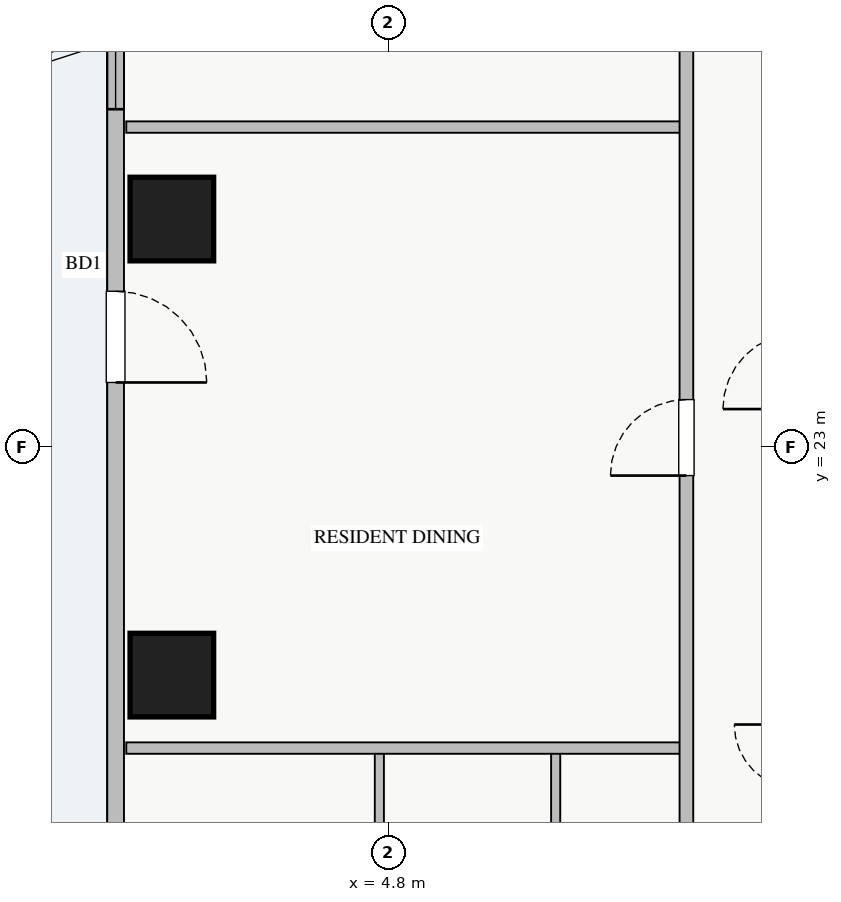
"""IFC4 building model, lengths in metres.
Left out: names, types, materials, properties, quantities, classifications, styles, units other than length and angle.
Written with IfcOpenShell. Run it as: python <this file> out.ifc"""

import sys

from ifc_helpers import new_model, si_unit, direction, frame, frame_2d, origin, origin_2d, place, context, subcontext, project, spatial, rectangle, extrude, source, transform, mapped, element, fill, save


model = new_model("IFC4")
c1 = context("Model", 3, precision=1e-05, world=origin(), true_north=direction((0.0, 1.0)))
c2 = subcontext(c1, "Body", "Model", "MODEL_VIEW")
j1 = project(units=[si_unit("LENGTHUNIT", "METRE"), si_unit("PLANEANGLEUNIT", "RADIAN")], contexts=[c1])
p1 = place(None, origin())
s1 = spatial("IfcSite", under=j1, at=p1, CompositionType="ELEMENT")
p2 = place(p1, origin())
s2 = spatial("IfcBuilding", under=s1, at=p2, CompositionType="ELEMENT")
p3 = place(p2, frame((0.0, 0.0, 129.5)))
s3 = spatial("IfcBuildingStorey", under=s2, at=p3, CompositionType="ELEMENT", Elevation=129.5)
m1 = source(origin(), c2, "Body", "SweptSolid", [
    extrude(rectangle(XDim=1.1, YDim=1.1, at=origin_2d()), origin(), (0.0, 0.0, 1.0), 3.25),
])
for number, where, z_axis, x_axis in (
    (1, (1.95, 26.0, 0.0), (0.0, 0.0, 1.0), (1.0, 0.0, 0.0)),
    (2, (1.95, 20.0, 0.0), (0.0, 0.0, 1.0), (1.0, 0.0, 0.0)),
):
    element("IfcColumn", number, at=place(p3, frame(where, z_axis=z_axis, x_axis=x_axis)), inside=s3, PredefinedType="COLUMN", context=c2, shape_type="MappedRepresentation", body=[
        mapped(m1, transform((0.0, 0.0, 0.0), x_axis=(1.0, 0.0, 0.0), y_axis=(0.0, 1.0, 0.0), z_axis=(0.0, 0.0, 1.0), scale=1.0)),
    ])
p4 = place(p3, frame((1.21, 10.55, 0.0), z_axis=(0.0, 0.0, 1.0), x_axis=(0.0, 1.0, 0.0)))
e3 = element("IfcWall", 3, at=p4, inside=s3, PredefinedType="STANDARD", context=c2, shape_type="SweptSolid", body=[
    extrude(rectangle(XDim=24.9, YDim=0.22, at=frame_2d((12.45, 0.0))), origin(), (0.0, 0.0, 1.0), 2.61),
])
p5 = place(p4, frame((13.3, 0.0, 0.0)))
e4 = element("IfcOpeningElement", 4, at=p5, cuts=e3, PredefinedType="OPENING", context=c2, shape_type="SweptSolid", body=[
    extrude(rectangle(XDim=1.2, YDim=2.1, at=frame_2d((0.6, 1.05))), frame((0.0, 0.12, 0.0), z_axis=(0.0, -1.0, 0.0), x_axis=(1.0, 0.0, 0.0)), (0.0, 0.0, 1.0), 0.24),
])
p6 = place(p4, frame((0.625, 0.0, 0.9)))
e5 = element("IfcOpeningElement", 5, at=p6, cuts=e3, PredefinedType="OPENING", context=c2, shape_type="SweptSolid", body=[
    extrude(rectangle(XDim=2.4, YDim=1.5, at=frame_2d((1.2, 0.75))), frame((0.0, 0.12, 0.0), z_axis=(0.0, -1.0, 0.0), x_axis=(1.0, 0.0, 0.0)), (0.0, 0.0, 1.0), 0.24),
])
p7 = place(p4, frame((21.82, 0.0, 0.9)))
e6 = element("IfcOpeningElement", 6, at=p7, cuts=e3, PredefinedType="OPENING", context=c2, shape_type="SweptSolid", body=[
    extrude(rectangle(XDim=2.1, YDim=1.5, at=frame_2d((1.05, 0.75))), frame((0.0, 0.12, 0.0), z_axis=(0.0, -1.0, 0.0), x_axis=(1.0, 0.0, 0.0)), (0.0, 0.0, 1.0), 0.24),
])
p8 = place(p4, frame((4.847, 0.0, 0.9)))
e7 = element("IfcOpeningElement", 7, at=p8, cuts=e3, PredefinedType="OPENING", context=c2, shape_type="SweptSolid", body=[
    extrude(rectangle(XDim=2.4, YDim=1.5, at=frame_2d((1.2, 0.75))), frame((0.0, 0.12, 0.0), z_axis=(0.0, -1.0, 0.0), x_axis=(1.0, 0.0, 0.0)), (0.0, 0.0, 1.0), 0.24),
])
p9 = place(p4, frame((16.895, 0.0, 0.9)))
e8 = element("IfcOpeningElement", 8, at=p9, cuts=e3, PredefinedType="OPENING", context=c2, shape_type="SweptSolid", body=[
    extrude(rectangle(XDim=0.9, YDim=1.2, at=frame_2d((0.45, 0.6))), frame((0.0, 0.12, 0.0), z_axis=(0.0, -1.0, 0.0), x_axis=(1.0, 0.0, 0.0)), (0.0, 0.0, 1.0), 0.24),
])
for number, where, z_axis, x_axis in (
    (9, (4.68, 14.17, 0.0), (0.0, 0.0, 1.0), (0.0, 1.0, 0.0)),
    (10, (7.0, 14.17, 0.0), (0.0, 0.0, 1.0), (0.0, 1.0, 0.0)),
):
    element("IfcWall", number, at=place(p3, frame(where, z_axis=z_axis, x_axis=x_axis)), inside=s3, PredefinedType="PLUMBINGWALL", context=c2, shape_type="SweptSolid", body=[
        extrude(rectangle(XDim=4.87, YDim=0.12, at=frame_2d((2.435, 0.0))), origin(), (0.0, 0.0, 1.0), 3.07),
    ])
for number, where, z_axis, x_axis in (
    (11, (1.35, 19.04, 0.0), (0.0, 0.0, 1.0), (1.0, 0.0, 0.0)),
    (12, (1.35, 27.21, 0.0), (0.0, 0.0, 1.0), (1.0, 0.0, 0.0)),
):
    element("IfcWall", number, at=place(p3, frame(where, z_axis=z_axis, x_axis=x_axis)), inside=s3, PredefinedType="PARTITIONING", context=c2, shape_type="SweptSolid", body=[
        extrude(rectangle(XDim=7.37, YDim=0.15, at=frame_2d((3.685, 0.0))), origin(), (0.0, 0.0, 1.0), 3.07),
    ])
p10 = place(p3, frame((8.72, 8.31, 0.0), z_axis=(0.0, 0.0, 1.0), x_axis=(0.0, 1.0, 0.0)))
e13 = element("IfcWall", 13, at=p10, inside=s3, PredefinedType="PARTITIONING", context=c2, shape_type="SweptSolid", body=[
    extrude(rectangle(XDim=29.37, YDim=0.18, at=frame_2d((14.685, 0.0))), origin(), (0.0, 0.0, 1.0), 3.07),
])
p11 = place(p10, frame((28.06, 0.0, 0.0)))
e14 = element("IfcOpeningElement", 14, at=p11, cuts=e13, PredefinedType="OPENING", context=c2, shape_type="SweptSolid", body=[
    extrude(rectangle(XDim=0.9, YDim=2.05, at=frame_2d((0.45, 1.025))), frame((0.0, 0.1, 0.0), z_axis=(0.0, -1.0, 0.0), x_axis=(1.0, 0.0, 0.0)), (0.0, 0.0, 1.0), 0.2),
])
p12 = place(p10, frame((0.24, 0.0, 0.0)))
e15 = element("IfcOpeningElement", 15, at=p12, cuts=e13, PredefinedType="OPENING", context=c2, shape_type="SweptSolid", body=[
    extrude(rectangle(XDim=0.9, YDim=2.05, at=frame_2d((0.45, 1.025))), frame((0.0, 0.1, 0.0), z_axis=(0.0, -1.0, 0.0), x_axis=(1.0, 0.0, 0.0)), (0.0, 0.0, 1.0), 0.2),
])
p13 = place(p10, frame((2.92, 0.0, 0.0)))
e16 = element("IfcOpeningElement", 16, at=p13, cuts=e13, PredefinedType="OPENING", context=c2, shape_type="SweptSolid", body=[
    extrude(rectangle(XDim=1.0, YDim=2.05, at=frame_2d((0.5, 1.025))), frame((0.0, 0.1, 0.0), z_axis=(0.0, -1.0, 0.0), x_axis=(1.0, 0.0, 0.0)), (0.0, 0.0, 1.0), 0.2),
])
p14 = place(p10, frame((14.315, 0.0, 0.0)))
e17 = element("IfcOpeningElement", 17, at=p14, cuts=e13, PredefinedType="OPENING", context=c2, shape_type="SweptSolid", body=[
    extrude(rectangle(XDim=1.0, YDim=2.05, at=frame_2d((0.5, 1.025))), frame((0.0, 0.1, 0.0), z_axis=(0.0, -1.0, 0.0), x_axis=(1.0, 0.0, 0.0)), (0.0, 0.0, 1.0), 0.2),
])
p15 = place(p10, frame((20.315, 0.0, 0.0)))
e18 = element("IfcOpeningElement", 18, at=p15, cuts=e13, PredefinedType="OPENING", context=c2, shape_type="SweptSolid", body=[
    extrude(rectangle(XDim=1.0, YDim=2.05, at=frame_2d((0.5, 1.025))), frame((0.0, 0.1, 0.0), z_axis=(0.0, -1.0, 0.0), x_axis=(1.0, 0.0, 0.0)), (0.0, 0.0, 1.0), 0.2),
])
m2 = source(origin(), c2, "Body", "SweptSolid", [
    extrude(rectangle(XDim=1.2, YDim=2.1, at=frame_2d((0.6, 1.05))), frame((0.0, 0.025, 0.0), z_axis=(0.0, -1.0, 0.0), x_axis=(1.0, 0.0, 0.0)), (0.0, 0.0, 1.0), 0.05),
])
p16 = place(p5, frame((1.2, 0.0, 0.0), z_axis=(0.0, 0.0, 1.0), x_axis=(-1.0, 0.0, 0.0)))
e19 = element("IfcDoor", 19, at=p16, inside=s3, OperationType="SINGLE_SWING_LEFT", PredefinedType="DOOR", context=c2, shape_type="MappedRepresentation", body=[
    mapped(m2, transform((0.0, 0.0, 0.0), x_axis=(1.0, 0.0, 0.0), y_axis=(0.0, 1.0, 0.0), z_axis=(0.0, 0.0, 1.0), scale=1.0)),
])
fill(e4, e19)
m3 = source(origin(), c2, "Body", "SweptSolid", [
    extrude(rectangle(XDim=1.0, YDim=2.05, at=frame_2d((0.5, 1.025))), frame((0.0, 0.025, 0.0), z_axis=(0.0, -1.0, 0.0), x_axis=(1.0, 0.0, 0.0)), (0.0, 0.0, 1.0), 0.05),
])
p17 = place(p14, origin())
e20 = element("IfcDoor", 20, at=p17, inside=s3, OperationType="SINGLE_SWING_LEFT", PredefinedType="DOOR", context=c2, shape_type="MappedRepresentation", body=[
    mapped(m3, transform((0.0, 0.0, 0.0), x_axis=(1.0, 0.0, 0.0), y_axis=(0.0, 1.0, 0.0), z_axis=(0.0, 0.0, 1.0), scale=1.0)),
])
fill(e17, e20)
m4 = source(origin(), c2, "Body", "SweptSolid", [
    extrude(rectangle(XDim=0.9, YDim=1.2, at=frame_2d((0.45, 0.6))), frame((0.0, 0.03, 0.0), z_axis=(0.0, -1.0, 0.0), x_axis=(1.0, 0.0, 0.0)), (0.0, 0.0, 1.0), 0.06),
])
p18 = place(p9, origin())
e21 = element("IfcWindow", 21, at=p18, inside=s3, PartitioningType="SINGLE_PANEL", PredefinedType="WINDOW", context=c2, shape_type="MappedRepresentation", body=[
    mapped(m4, transform((0.0, 0.0, 0.0), x_axis=(1.0, 0.0, 0.0), y_axis=(0.0, 1.0, 0.0), z_axis=(0.0, 0.0, 1.0), scale=1.0)),
])
fill(e8, e21)
save(model, sys.argv[1])
